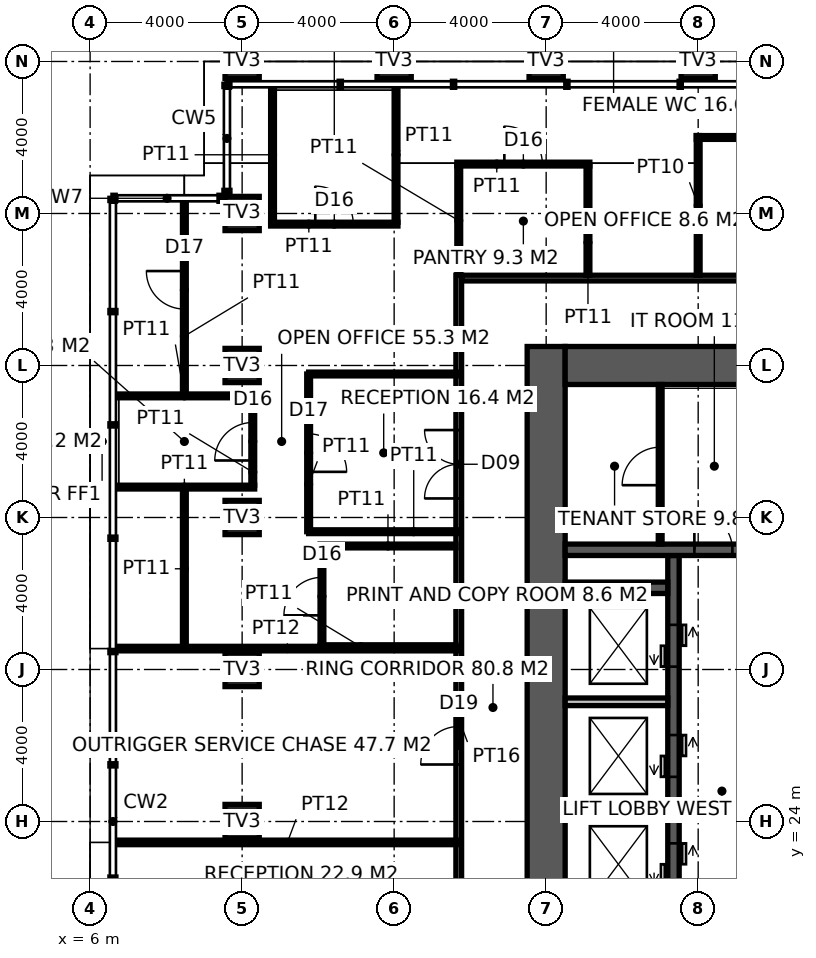
"""IFC4 building model, lengths in metres.
Left out: names, types, materials, properties, quantities, classifications, styles, units other than length and angle.
Written with IfcOpenShell. Run it as: python <this file> out.ifc"""

import sys

from ifc_helpers import new_model, si_unit, direction, frame, frame_2d, origin, origin_2d, place, context, subcontext, project, spatial, rectangle, hollow_rectangle, extrude, element, fill, save


model = new_model("IFC4")
c1 = context("Model", 3, precision=1e-05, world=origin(), true_north=direction((0.0, 1.0)))
c2 = subcontext(c1, "Body", "Model", "MODEL_VIEW")
j1 = project(units=[si_unit("LENGTHUNIT", "METRE"), si_unit("PLANEANGLEUNIT", "RADIAN")], contexts=[c1])
p1 = place(None, origin())
s1 = spatial("IfcSite", under=j1, at=p1, CompositionType="ELEMENT")
p2 = place(p1, origin())
s2 = spatial("IfcBuilding", under=s1, at=p2, CompositionType="ELEMENT")
p3 = place(p2, frame((0.0, 0.0, 270.2)))
s3 = spatial("IfcBuildingStorey", under=s2, at=p3, CompositionType="ELEMENT", Elevation=270.2)
for number, where, z_axis, x_axis in (
    (1, (10.0, 44.0, 0.0), (0.0, 0.0, 1.0), (1.0, 0.0, 0.0)),
    (2, (14.0, 44.0, 0.0), (0.0, 0.0, 1.0), (1.0, 0.0, 0.0)),
    (3, (18.0, 44.0, 0.0), (0.0, 0.0, 1.0), (1.0, 0.0, 0.0)),
    (4, (22.0, 44.0, 0.0), (0.0, 0.0, 1.0), (1.0, 0.0, 0.0)),
    (5, (10.0, 24.0, 0.0), (0.0, 0.0, 1.0), (1.0, 0.0, 0.0)),
    (6, (10.0, 28.0, 0.0), (0.0, 0.0, 1.0), (1.0, 0.0, 0.0)),
    (7, (10.0, 32.0, 0.0), (0.0, 0.0, 1.0), (1.0, 0.0, 0.0)),
    (8, (10.0, 36.0, 0.0), (0.0, 0.0, 1.0), (1.0, 0.0, 0.0)),
    (9, (10.0, 40.0, 0.0), (0.0, 0.0, 1.0), (1.0, 0.0, 0.0)),
):
    element("IfcColumn", number, at=place(p3, frame(where, z_axis=z_axis, x_axis=x_axis)), inside=s3, PredefinedType="USERDEFINED", context=c2, shape_type="SweptSolid", body=[
        extrude(hollow_rectangle(XDim=0.9, YDim=0.9, WallThickness=0.08, at=origin_2d()), origin(), (0.0, 0.0, 1.0), 4.0),
    ])
p4 = place(p3, frame((18.0, 17.5, -0.15), z_axis=(0.0, 0.0, 1.0), x_axis=(0.0, 1.0, 0.0)))
e10 = element("IfcWall", 10, at=p4, inside=s3, PredefinedType="SHEAR", context=c2, shape_type="SweptSolid", body=[
    extrude(rectangle(XDim=19.0, YDim=1.0, at=frame_2d((9.5, 0.0))), origin(), (0.0, 0.0, 1.0), 4.0),
])
p5 = place(p3, frame((18.5, 36.0, -0.15), z_axis=(0.0, 0.0, 1.0), x_axis=(1.0, 0.0, 0.0)))
e11 = element("IfcWall", 11, at=p5, inside=s3, PredefinedType="SHEAR", context=c2, shape_type="SweptSolid", body=[
    extrude(rectangle(XDim=17.6, YDim=1.0, at=frame_2d((8.8, 0.0))), origin(), (0.0, 0.0, 1.0), 4.0),
])
p6 = place(p3, frame((21.35, 18.5, -0.15), z_axis=(0.0, 0.0, 1.0), x_axis=(0.0, 1.0, 0.0)))
e12 = element("IfcWall", 12, at=p6, inside=s3, PredefinedType="SHEAR", context=c2, shape_type="SweptSolid", body=[
    extrude(rectangle(XDim=12.5, YDim=0.3, at=frame_2d((6.25, 0.0))), origin(), (0.0, 0.0, 1.0), 4.0),
])
p7 = place(p6, frame((0.875, 0.0, 0.15)))
e13 = element("IfcOpeningElement", 13, at=p7, cuts=e12, PredefinedType="OPENING", context=c2, shape_type="SweptSolid", body=[
    extrude(rectangle(XDim=1.1, YDim=2.2, at=frame_2d((0.55, 1.1))), frame((0.0, 0.16, 0.0), z_axis=(0.0, -1.0, 0.0), x_axis=(1.0, 0.0, 0.0)), (0.0, 0.0, 1.0), 0.32),
])
p8 = place(p6, frame((3.825, 0.0, 0.15)))
e14 = element("IfcOpeningElement", 14, at=p8, cuts=e12, PredefinedType="OPENING", context=c2, shape_type="SweptSolid", body=[
    extrude(rectangle(XDim=1.1, YDim=2.2, at=frame_2d((0.55, 1.1))), frame((0.0, 0.16, 0.0), z_axis=(0.0, -1.0, 0.0), x_axis=(1.0, 0.0, 0.0)), (0.0, 0.0, 1.0), 0.32),
])
p9 = place(p6, frame((6.675, 0.0, 0.15)))
e15 = element("IfcOpeningElement", 15, at=p9, cuts=e12, PredefinedType="OPENING", context=c2, shape_type="SweptSolid", body=[
    extrude(rectangle(XDim=1.1, YDim=2.2, at=frame_2d((0.55, 1.1))), frame((0.0, 0.16, 0.0), z_axis=(0.0, -1.0, 0.0), x_axis=(1.0, 0.0, 0.0)), (0.0, 0.0, 1.0), 0.32),
])
p10 = place(p6, frame((9.575, 0.0, 0.15)))
e16 = element("IfcOpeningElement", 16, at=p10, cuts=e12, PredefinedType="OPENING", context=c2, shape_type="SweptSolid", body=[
    extrude(rectangle(XDim=1.1, YDim=2.2, at=frame_2d((0.55, 1.1))), frame((0.0, 0.16, 0.0), z_axis=(0.0, -1.0, 0.0), x_axis=(1.0, 0.0, 0.0)), (0.0, 0.0, 1.0), 0.32),
])
p11 = place(p3, frame((18.5, 31.15, -0.15), z_axis=(0.0, 0.0, 1.0), x_axis=(1.0, 0.0, 0.0)))
e17 = element("IfcWall", 17, at=p11, inside=s3, PredefinedType="SHEAR", context=c2, shape_type="SweptSolid", body=[
    extrude(rectangle(XDim=5.35, YDim=0.3, at=frame_2d((2.675, 0.0))), origin(), (0.0, 0.0, 1.0), 4.0),
])
p12 = place(p11, frame((3.4, 0.0, 0.15)))
e18 = element("IfcOpeningElement", 18, at=p12, cuts=e17, PredefinedType="OPENING", context=c2, shape_type="SweptSolid", body=[
    extrude(rectangle(XDim=1.0, YDim=2.2, at=frame_2d((0.5, 1.1))), frame((0.0, 0.16, 0.0), z_axis=(0.0, -1.0, 0.0), x_axis=(1.0, 0.0, 0.0)), (0.0, 0.0, 1.0), 0.32),
])
p13 = place(p3, frame((18.5, 30.15, -0.15), z_axis=(0.0, 0.0, 1.0), x_axis=(1.0, 0.0, 0.0)))
e19 = element("IfcWall", 19, at=p13, inside=s3, PredefinedType="SHEAR", context=c2, shape_type="SweptSolid", body=[
    extrude(rectangle(XDim=2.7, YDim=0.3, at=frame_2d((1.35, 0.0))), origin(), (0.0, 0.0, 1.0), 4.0),
])
for number, where, z_axis, x_axis in (
    (20, (18.5, 24.3, -0.15), (0.0, 0.0, 1.0), (1.0, 0.0, 0.0)),
    (21, (18.5, 27.15, -0.15), (0.0, 0.0, 1.0), (1.0, 0.0, 0.0)),
):
    element("IfcWall", number, at=place(p3, frame(where, z_axis=z_axis, x_axis=x_axis)), inside=s3, PredefinedType="SOLIDWALL", context=c2, shape_type="SweptSolid", body=[
        extrude(rectangle(XDim=2.7, YDim=0.2, at=frame_2d((1.35, 0.0))), origin(), (0.0, 0.0, 1.0), 4.0),
    ])
p14 = place(p3, frame((21.0, 31.3, 0.0), z_axis=(0.0, 0.0, 1.0), x_axis=(0.0, 1.0, 0.0)))
e22 = element("IfcWall", 22, at=p14, inside=s3, PredefinedType="PARTITIONING", context=c2, shape_type="SweptSolid", body=[
    extrude(rectangle(XDim=4.2, YDim=0.1, at=frame_2d((2.1, 0.0))), origin(), (0.0, 0.0, 1.0), 3.85),
])
p15 = place(p14, frame((1.55, 0.0, 0.0)))
e23 = element("IfcOpeningElement", 23, at=p15, cuts=e22, PredefinedType="OPENING", context=c2, shape_type="SweptSolid", body=[
    extrude(rectangle(XDim=1.0, YDim=2.2, at=frame_2d((0.5, 1.1))), frame((0.0, 0.06, 0.0), z_axis=(0.0, -1.0, 0.0), x_axis=(1.0, 0.0, 0.0)), (0.0, 0.0, 1.0), 0.12),
])
p16 = place(p3, frame((15.7, 15.025, 0.0), z_axis=(0.0, 0.0, 1.0), x_axis=(0.0, 1.0, 0.0)))
e24 = element("IfcWall", 24, at=p16, inside=s3, PredefinedType="PARTITIONING", context=c2, shape_type="SweptSolid", body=[
    extrude(rectangle(XDim=23.35, YDim=0.15, at=frame_2d((11.675, 0.0))), origin(), (0.0, 0.0, 1.0), 3.85),
])
p17 = place(p16, frame((3.374, 0.0, 0.0)))
e25 = element("IfcOpeningElement", 25, at=p17, cuts=e24, PredefinedType="OPENING", context=c2, shape_type="SweptSolid", body=[
    extrude(rectangle(XDim=1.8, YDim=2.4, at=frame_2d((0.9, 1.2))), frame((0.0, 0.085, 0.0), z_axis=(0.0, -1.0, 0.0), x_axis=(1.0, 0.0, 0.0)), (0.0, 0.0, 1.0), 0.17),
])
p18 = place(p16, frame((17.476, 0.0, 0.0)))
e26 = element("IfcOpeningElement", 26, at=p18, cuts=e24, PredefinedType="OPENING", context=c2, shape_type="SweptSolid", body=[
    extrude(rectangle(XDim=1.8, YDim=2.4, at=frame_2d((0.9, 1.2))), frame((0.0, 0.085, 0.0), z_axis=(0.0, -1.0, 0.0), x_axis=(1.0, 0.0, 0.0)), (0.0, 0.0, 1.0), 0.17),
])
p19 = place(p16, frame((10.475, 0.0, 0.0)))
e27 = element("IfcOpeningElement", 27, at=p19, cuts=e24, PredefinedType="OPENING", context=c2, shape_type="SweptSolid", body=[
    extrude(rectangle(XDim=1.0, YDim=2.2, at=frame_2d((0.5, 1.1))), frame((0.0, 0.085, 0.0), z_axis=(0.0, -1.0, 0.0), x_axis=(1.0, 0.0, 0.0)), (0.0, 0.0, 1.0), 0.17),
])
p20 = place(p3, frame((15.775, 38.3, 0.0), z_axis=(0.0, 0.0, 1.0), x_axis=(1.0, 0.0, 0.0)))
e28 = element("IfcWall", 28, at=p20, inside=s3, PredefinedType="PARTITIONING", context=c2, shape_type="SweptSolid", body=[
    extrude(rectangle(XDim=22.65, YDim=0.15, at=frame_2d((11.325, 0.0))), origin(), (0.0, 0.0, 1.0), 3.85),
])
p21 = place(p20, frame((7.975, 0.0, 0.0)))
e29 = element("IfcOpeningElement", 29, at=p21, cuts=e28, PredefinedType="OPENING", context=c2, shape_type="SweptSolid", body=[
    extrude(rectangle(XDim=0.9, YDim=2.1, at=frame_2d((0.45, 1.05))), frame((0.0, 0.085, 0.0), z_axis=(0.0, -1.0, 0.0), x_axis=(1.0, 0.0, 0.0)), (0.0, 0.0, 1.0), 0.17),
])
p22 = place(p20, frame((11.725, 0.0, 0.0)))
e30 = element("IfcOpeningElement", 30, at=p22, cuts=e28, PredefinedType="OPENING", context=c2, shape_type="SweptSolid", body=[
    extrude(rectangle(XDim=1.0, YDim=2.1, at=frame_2d((0.5, 1.05))), frame((0.0, 0.085, 0.0), z_axis=(0.0, -1.0, 0.0), x_axis=(1.0, 0.0, 0.0)), (0.0, 0.0, 1.0), 0.17),
])
p23 = place(p20, frame((15.575, 0.0, 0.0)))
e31 = element("IfcOpeningElement", 31, at=p23, cuts=e28, PredefinedType="OPENING", context=c2, shape_type="SweptSolid", body=[
    extrude(rectangle(XDim=0.9, YDim=2.1, at=frame_2d((0.45, 1.05))), frame((0.0, 0.085, 0.0), z_axis=(0.0, -1.0, 0.0), x_axis=(1.0, 0.0, 0.0)), (0.0, 0.0, 1.0), 0.17),
])
p24 = place(p3, frame((22.0, 38.375, 0.0), z_axis=(0.0, 0.0, 1.0), x_axis=(0.0, 1.0, 0.0)))
e32 = element("IfcWall", 32, at=p24, inside=s3, PredefinedType="PARTITIONING", context=c2, shape_type="SweptSolid", body=[
    extrude(rectangle(XDim=3.675, YDim=0.1, at=frame_2d((1.837, 0.0))), origin(), (0.0, 0.0, 1.0), 2.85),
])
p25 = place(p3, frame((21.95, 42.0, 0.0), z_axis=(0.0, 0.0, 1.0), x_axis=(1.0, 0.0, 0.0)))
e33 = element("IfcWall", 33, at=p25, inside=s3, PredefinedType="PARTITIONING", context=c2, shape_type="SweptSolid", body=[
    extrude(rectangle(XDim=12.1, YDim=0.1, at=frame_2d((6.05, 0.0))), origin(), (0.0, 0.0, 1.0), 3.85),
])
for number, where, z_axis, x_axis in (
    (34, (6.68, 23.45, 0.0), (0.0, 0.0, 1.0), (1.0, 0.0, 0.0)),
    (35, (6.68, 28.55, 0.0), (0.0, 0.0, 1.0), (1.0, 0.0, 0.0)),
):
    element("IfcWall", number, at=place(p3, frame(where, z_axis=z_axis, x_axis=x_axis)), inside=s3, PredefinedType="PARTITIONING", context=c2, shape_type="SweptSolid", body=[
        extrude(rectangle(XDim=9.02, YDim=0.12, at=frame_2d((4.51, 0.0))), origin(), (0.0, 0.0, 1.0), 3.85),
    ])
for number, where, z_axis, x_axis in (
    (36, (12.05, 28.6, 0.0), (0.0, 0.0, 1.0), (1.0, 0.0, 0.0)),
    (37, (12.05, 31.25, 0.0), (0.0, 0.0, 1.0), (1.0, 0.0, 0.0)),
):
    element("IfcWall", number, at=place(p3, frame(where, z_axis=z_axis, x_axis=x_axis)), inside=s3, PredefinedType="PARTITIONING", context=c2, shape_type="SweptSolid", body=[
        extrude(rectangle(XDim=3.575, YDim=0.1, at=frame_2d((1.788, 0.0))), origin(), (0.0, 0.0, 1.0), 3.85),
    ])
for number, where, z_axis, x_axis in (
    (38, (6.63, 32.8, 0.0), (0.0, 0.0, 1.0), (1.0, 0.0, 0.0)),
    (39, (6.63, 35.2, 0.0), (0.0, 0.0, 1.0), (1.0, 0.0, 0.0)),
):
    element("IfcWall", number, at=place(p3, frame(where, z_axis=z_axis, x_axis=x_axis)), inside=s3, PredefinedType="PARTITIONING", context=c2, shape_type="SweptSolid", body=[
        extrude(rectangle(XDim=3.7, YDim=0.1, at=frame_2d((1.85, 0.0))), origin(), (0.0, 0.0, 1.0), 3.85),
    ])
p26 = place(p3, frame((10.75, 39.72, 0.0), z_axis=(0.0, 0.0, 1.0), x_axis=(1.0, 0.0, 0.0)))
e40 = element("IfcWall", 40, at=p26, inside=s3, PredefinedType="PARTITIONING", context=c2, shape_type="SweptSolid", body=[
    extrude(rectangle(XDim=3.35, YDim=0.1, at=frame_2d((1.675, 0.0))), origin(), (0.0, 0.0, 1.0), 3.85),
])
p27 = place(p26, frame((1.175, 0.0, 0.0)))
e41 = element("IfcOpeningElement", 41, at=p27, cuts=e40, PredefinedType="OPENING", context=c2, shape_type="SweptSolid", body=[
    extrude(rectangle(XDim=1.0, YDim=2.2, at=frame_2d((0.5, 1.1))), frame((0.0, 0.06, 0.0), z_axis=(0.0, -1.0, 0.0), x_axis=(1.0, 0.0, 0.0)), (0.0, 0.0, 1.0), 0.12),
])
p28 = place(p3, frame((15.65, 41.3, 0.0), z_axis=(0.0, 0.0, 1.0), x_axis=(1.0, 0.0, 0.0)))
e42 = element("IfcWall", 42, at=p28, inside=s3, PredefinedType="PARTITIONING", context=c2, shape_type="SweptSolid", body=[
    extrude(rectangle(XDim=3.5, YDim=0.1, at=frame_2d((1.75, 0.0))), origin(), (0.0, 0.0, 1.0), 3.85),
])
p29 = place(p28, frame((1.25, 0.0, 0.0)))
e43 = element("IfcOpeningElement", 43, at=p29, cuts=e42, PredefinedType="OPENING", context=c2, shape_type="SweptSolid", body=[
    extrude(rectangle(XDim=1.0, YDim=2.2, at=frame_2d((0.5, 1.1))), frame((0.0, 0.06, 0.0), z_axis=(0.0, -1.0, 0.0), x_axis=(1.0, 0.0, 0.0)), (0.0, 0.0, 1.0), 0.12),
])
p30 = place(p3, frame((10.28, 32.85, 0.0), z_axis=(0.0, 0.0, 1.0), x_axis=(0.0, 1.0, 0.0)))
e44 = element("IfcWall", 44, at=p30, inside=s3, PredefinedType="PARTITIONING", context=c2, shape_type="SweptSolid", body=[
    extrude(rectangle(XDim=2.3, YDim=0.1, at=frame_2d((1.15, 0.0))), origin(), (0.0, 0.0, 1.0), 3.85),
])
p31 = place(p30, frame((0.65, 0.0, 0.0)))
e45 = element("IfcOpeningElement", 45, at=p31, cuts=e44, PredefinedType="OPENING", context=c2, shape_type="SweptSolid", body=[
    extrude(rectangle(XDim=1.0, YDim=2.2, at=frame_2d((0.5, 1.1))), frame((0.0, 0.06, 0.0), z_axis=(0.0, -1.0, 0.0), x_axis=(1.0, 0.0, 0.0)), (0.0, 0.0, 1.0), 0.12),
])
p32 = place(p3, frame((10.8, 39.77, 0.0), z_axis=(0.0, 0.0, 1.0), x_axis=(0.0, 1.0, 0.0)))
e46 = element("IfcWall", 46, at=p32, inside=s3, PredefinedType="PARTITIONING", context=c2, shape_type="SweptSolid", body=[
    extrude(rectangle(XDim=3.55, YDim=0.1, at=frame_2d((1.775, 0.0))), origin(), (0.0, 0.0, 1.0), 3.85),
])
p33 = place(p3, frame((12.1, 28.65, 0.0), z_axis=(0.0, 0.0, 1.0), x_axis=(0.0, 1.0, 0.0)))
e47 = element("IfcWall", 47, at=p33, inside=s3, PredefinedType="PARTITIONING", context=c2, shape_type="SweptSolid", body=[
    extrude(rectangle(XDim=2.55, YDim=0.1, at=frame_2d((1.275, 0.0))), origin(), (0.0, 0.0, 1.0), 3.85),
])
p34 = place(p33, frame((0.775, 0.0, 0.0)))
e48 = element("IfcOpeningElement", 48, at=p34, cuts=e47, PredefinedType="OPENING", context=c2, shape_type="SweptSolid", body=[
    extrude(rectangle(XDim=1.0, YDim=2.2, at=frame_2d((0.5, 1.1))), frame((0.0, 0.06, 0.0), z_axis=(0.0, -1.0, 0.0), x_axis=(1.0, 0.0, 0.0)), (0.0, 0.0, 1.0), 0.12),
])
p35 = place(p3, frame((14.05, 39.77, 0.0), z_axis=(0.0, 0.0, 1.0), x_axis=(0.0, 1.0, 0.0)))
e49 = element("IfcWall", 49, at=p35, inside=s3, PredefinedType="PARTITIONING", context=c2, shape_type="SweptSolid", body=[
    extrude(rectangle(XDim=3.55, YDim=0.1, at=frame_2d((1.775, 0.0))), origin(), (0.0, 0.0, 1.0), 2.85),
])
for number, where, z_axis, x_axis in (
    (50, (15.7, 38.375, 0.0), (0.0, 0.0, 1.0), (0.0, 1.0, 0.0)),
    (51, (19.1, 38.375, 0.0), (0.0, 0.0, 1.0), (0.0, 1.0, 0.0)),
):
    element("IfcWall", number, at=place(p3, frame(where, z_axis=z_axis, x_axis=x_axis)), inside=s3, PredefinedType="PARTITIONING", context=c2, shape_type="SweptSolid", body=[
        extrude(rectangle(XDim=2.875, YDim=0.1, at=frame_2d((1.438, 0.0))), origin(), (0.0, 0.0, 1.0), 3.85),
    ])
p36 = place(p3, frame((8.48, 28.551, 0.0), z_axis=(0.0, 0.0, 1.0), x_axis=(0.0, 1.0, 0.0)))
e52 = element("IfcWall", 52, at=p36, inside=s3, PredefinedType="PARTITIONING", context=c2, shape_type="SweptSolid", body=[
    extrude(rectangle(XDim=4.199, YDim=0.1, at=frame_2d((2.1, 0.0))), origin(), (0.0, 0.0, 1.0), 3.85),
])
p37 = place(p3, frame((8.48, 35.25, 0.0), z_axis=(0.0, 0.0, 1.0), x_axis=(0.0, 1.0, 0.0)))
e53 = element("IfcWall", 53, at=p37, inside=s3, PredefinedType="PARTITIONING", context=c2, shape_type="SweptSolid", body=[
    extrude(rectangle(XDim=5.07, YDim=0.1, at=frame_2d((2.535, 0.0))), origin(), (0.0, 0.0, 1.0), 3.85),
])
p38 = place(p37, frame((2.235, 0.0, 0.0)))
e54 = element("IfcOpeningElement", 54, at=p38, cuts=e53, PredefinedType="OPENING", context=c2, shape_type="SweptSolid", body=[
    extrude(rectangle(XDim=1.0, YDim=2.2, at=frame_2d((0.5, 1.1))), frame((0.0, 0.06, 0.0), z_axis=(0.0, -1.0, 0.0), x_axis=(1.0, 0.0, 0.0)), (0.0, 0.0, 1.0), 0.12),
])
p39 = place(p3, frame((15.7, 35.776, 0.0), z_axis=(0.0, 0.0, 1.0), x_axis=(-1.0, 0.0, 0.0)))
e55 = element("IfcWall", 55, at=p39, inside=s3, PredefinedType="PARTITIONING", context=c2, shape_type="SweptSolid", body=[
    extrude(rectangle(XDim=3.95, YDim=0.1, at=frame_2d((1.975, 0.0))), origin(), (0.0, 0.0, 1.0), 2.65),
])
p40 = place(p3, frame((11.75, 35.776, 0.0), z_axis=(0.0, 0.0, 1.0), x_axis=(0.0, -1.0, 0.0)))
e56 = element("IfcWall", 56, at=p40, inside=s3, PredefinedType="PARTITIONING", context=c2, shape_type="SweptSolid", body=[
    extrude(rectangle(XDim=4.15, YDim=0.1, at=frame_2d((2.075, 0.0))), origin(), (0.0, 0.0, 1.0), 3.85),
])
p41 = place(p40, frame((1.575, 0.0, 0.0)))
e57 = element("IfcOpeningElement", 57, at=p41, cuts=e56, PredefinedType="OPENING", context=c2, shape_type="SweptSolid", body=[
    extrude(rectangle(XDim=1.0, YDim=2.2, at=frame_2d((0.5, 1.1))), frame((0.0, 0.06, 0.0), z_axis=(0.0, -1.0, 0.0), x_axis=(1.0, 0.0, 0.0)), (0.0, 0.0, 1.0), 0.12),
])
p42 = place(p3, frame((11.75, 31.626, 0.0), z_axis=(0.0, 0.0, 1.0), x_axis=(1.0, 0.0, 0.0)))
e58 = element("IfcWall", 58, at=p42, inside=s3, PredefinedType="PARTITIONING", context=c2, shape_type="SweptSolid", body=[
    extrude(rectangle(XDim=3.95, YDim=0.1, at=frame_2d((1.975, 0.0))), origin(), (0.0, 0.0, 1.0), 2.95),
])
p43 = place(p12, origin())
e59 = element("IfcDoor", 59, at=p43, inside=s3, OperationType="SINGLE_SWING_LEFT", PredefinedType="DOOR", context=c2, shape_type="SweptSolid", body=[
    extrude(rectangle(XDim=1.0, YDim=2.2, at=frame_2d((0.5, 1.1))), frame((0.0, 0.025, 0.0), z_axis=(0.0, -1.0, 0.0), x_axis=(1.0, 0.0, 0.0)), (0.0, 0.0, 1.0), 0.05),
])
fill(e18, e59)
p44 = place(p15, origin())
e60 = element("IfcDoor", 60, at=p44, inside=s3, OperationType="SINGLE_SWING_LEFT", PredefinedType="DOOR", context=c2, shape_type="SweptSolid", body=[
    extrude(rectangle(XDim=1.0, YDim=2.2, at=frame_2d((0.5, 1.1))), frame((0.0, 0.025, 0.0), z_axis=(0.0, -1.0, 0.0), x_axis=(1.0, 0.0, 0.0)), (0.0, 0.0, 1.0), 0.05),
])
fill(e23, e60)
p45 = place(p18, origin())
e61 = element("IfcDoor", 61, at=p45, inside=s3, OperationType="DOUBLE_DOOR_DOUBLE_SWING", PredefinedType="DOOR", context=c2, shape_type="SweptSolid", body=[
    extrude(rectangle(XDim=1.8, YDim=2.4, at=frame_2d((0.9, 1.2))), frame((0.0, 0.025, 0.0), z_axis=(0.0, -1.0, 0.0), x_axis=(1.0, 0.0, 0.0)), (0.0, 0.0, 1.0), 0.05),
])
fill(e26, e61)
p46 = place(p19, origin())
e62 = element("IfcDoor", 62, at=p46, inside=s3, OperationType="SINGLE_SWING_LEFT", PredefinedType="DOOR", context=c2, shape_type="SweptSolid", body=[
    extrude(rectangle(XDim=1.0, YDim=2.2, at=frame_2d((0.5, 1.1))), frame((0.0, 0.025, 0.0), z_axis=(0.0, -1.0, 0.0), x_axis=(1.0, 0.0, 0.0)), (0.0, 0.0, 1.0), 0.05),
])
fill(e27, e62)
p47 = place(p27, origin())
e63 = element("IfcDoor", 63, at=p47, inside=s3, OperationType="SINGLE_SWING_LEFT", PredefinedType="DOOR", context=c2, shape_type="SweptSolid", body=[
    extrude(rectangle(XDim=1.0, YDim=2.2, at=frame_2d((0.5, 1.1))), frame((0.0, 0.025, 0.0), z_axis=(0.0, -1.0, 0.0), x_axis=(1.0, 0.0, 0.0)), (0.0, 0.0, 1.0), 0.05),
])
fill(e41, e63)
p48 = place(p29, origin())
e64 = element("IfcDoor", 64, at=p48, inside=s3, OperationType="SINGLE_SWING_LEFT", PredefinedType="DOOR", context=c2, shape_type="SweptSolid", body=[
    extrude(rectangle(XDim=1.0, YDim=2.2, at=frame_2d((0.5, 1.1))), frame((0.0, 0.025, 0.0), z_axis=(0.0, -1.0, 0.0), x_axis=(1.0, 0.0, 0.0)), (0.0, 0.0, 1.0), 0.05),
])
fill(e43, e64)
p49 = place(p34, origin())
e65 = element("IfcDoor", 65, at=p49, inside=s3, OperationType="SINGLE_SWING_LEFT", PredefinedType="DOOR", context=c2, shape_type="SweptSolid", body=[
    extrude(rectangle(XDim=1.0, YDim=2.2, at=frame_2d((0.5, 1.1))), frame((0.0, 0.025, 0.0), z_axis=(0.0, -1.0, 0.0), x_axis=(1.0, 0.0, 0.0)), (0.0, 0.0, 1.0), 0.05),
])
fill(e48, e65)
p50 = place(p31, origin())
e66 = element("IfcDoor", 66, at=p50, inside=s3, OperationType="SINGLE_SWING_LEFT", PredefinedType="DOOR", context=c2, shape_type="SweptSolid", body=[
    extrude(rectangle(XDim=1.0, YDim=2.2, at=frame_2d((0.5, 1.1))), frame((0.0, 0.025, 0.0), z_axis=(0.0, -1.0, 0.0), x_axis=(1.0, 0.0, 0.0)), (0.0, 0.0, 1.0), 0.05),
])
fill(e45, e66)
p51 = place(p38, origin())
e67 = element("IfcDoor", 67, at=p51, inside=s3, OperationType="SINGLE_SWING_RIGHT", PredefinedType="DOOR", context=c2, shape_type="SweptSolid", body=[
    extrude(rectangle(XDim=1.0, YDim=2.2, at=frame_2d((0.5, 1.1))), frame((0.0, 0.025, 0.0), z_axis=(0.0, -1.0, 0.0), x_axis=(1.0, 0.0, 0.0)), (0.0, 0.0, 1.0), 0.05),
])
fill(e54, e67)
p52 = place(p41, origin())
e68 = element("IfcDoor", 68, at=p52, inside=s3, OperationType="SINGLE_SWING_RIGHT", PredefinedType="DOOR", context=c2, shape_type="SweptSolid", body=[
    extrude(rectangle(XDim=1.0, YDim=2.2, at=frame_2d((0.5, 1.1))), frame((0.0, 0.025, 0.0), z_axis=(0.0, -1.0, 0.0), x_axis=(1.0, 0.0, 0.0)), (0.0, 0.0, 1.0), 0.05),
])
fill(e57, e68)
p53 = place(p8, origin())
e69 = element("IfcDoor", 69, at=p53, inside=s3, OperationType="DOUBLE_DOOR_SLIDING", PredefinedType="DOOR", context=c2, shape_type="SweptSolid", body=[
    extrude(rectangle(XDim=1.1, YDim=2.2, at=frame_2d((0.55, 1.1))), frame((0.0, 0.025, 0.0), z_axis=(0.0, -1.0, 0.0), x_axis=(1.0, 0.0, 0.0)), (0.0, 0.0, 1.0), 0.05),
])
fill(e14, e69)
p54 = place(p9, origin())
e70 = element("IfcDoor", 70, at=p54, inside=s3, OperationType="DOUBLE_DOOR_SLIDING", PredefinedType="DOOR", context=c2, shape_type="SweptSolid", body=[
    extrude(rectangle(XDim=1.1, YDim=2.2, at=frame_2d((0.55, 1.1))), frame((0.0, 0.025, 0.0), z_axis=(0.0, -1.0, 0.0), x_axis=(1.0, 0.0, 0.0)), (0.0, 0.0, 1.0), 0.05),
])
fill(e15, e70)
p55 = place(p10, origin())
e71 = element("IfcDoor", 71, at=p55, inside=s3, OperationType="DOUBLE_DOOR_SLIDING", PredefinedType="DOOR", context=c2, shape_type="SweptSolid", body=[
    extrude(rectangle(XDim=1.1, YDim=2.2, at=frame_2d((0.55, 1.1))), frame((0.0, 0.025, 0.0), z_axis=(0.0, -1.0, 0.0), x_axis=(1.0, 0.0, 0.0)), (0.0, 0.0, 1.0), 0.05),
])
fill(e16, e71)
save(model, sys.argv[1])
